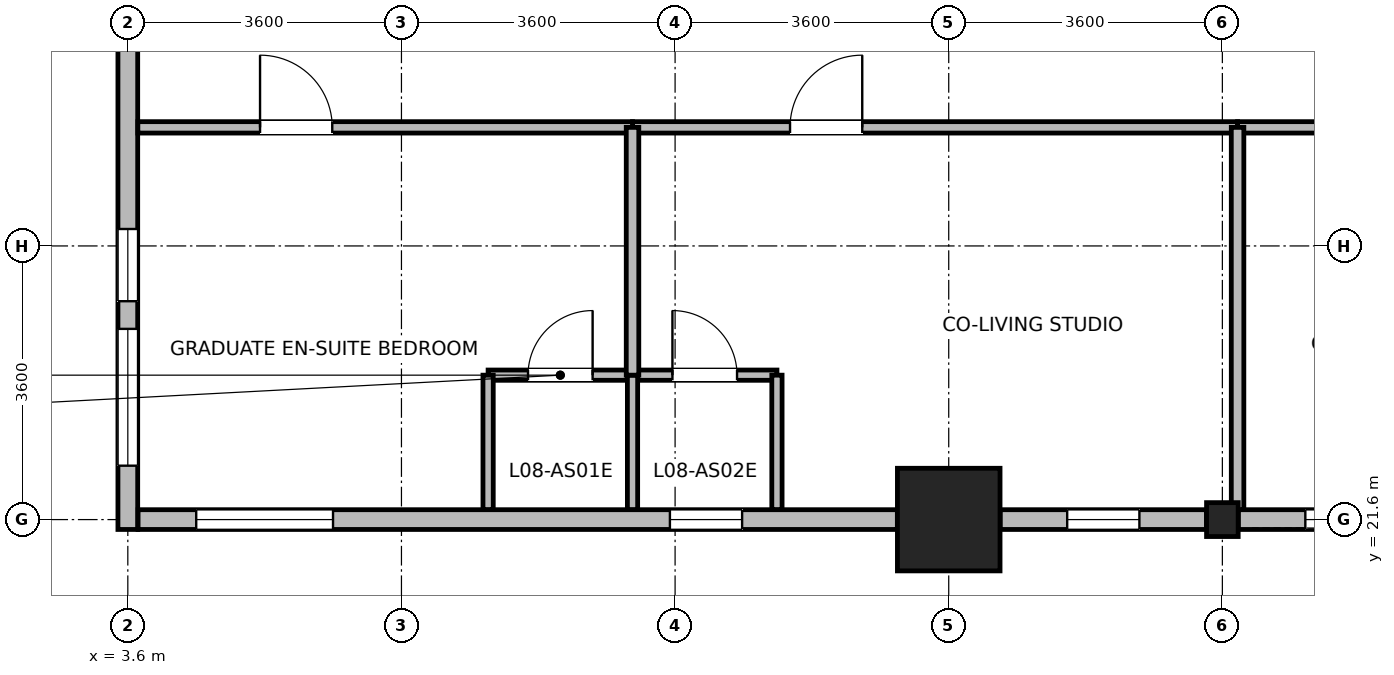
"""IFC4 building model, lengths in metres.
Left out: names, types, materials, properties, quantities, classifications, styles, units other than length and angle.
Written with IfcOpenShell. Run it as: python <this file> out.ifc"""

import sys

from ifc_helpers import new_model, si_unit, direction, frame, frame_2d, origin, origin_2d, place, context, subcontext, project, spatial, rectangle, i_section, extrude, source, transform, mapped, element, fill, save


model = new_model("IFC4")
c1 = context("Model", 3, precision=1e-05, world=origin(), true_north=direction((0.0, 1.0)))
c2 = subcontext(c1, "Body", "Model", "MODEL_VIEW")
j1 = project(units=[si_unit("LENGTHUNIT", "METRE"), si_unit("PLANEANGLEUNIT", "RADIAN")], contexts=[c1])
p1 = place(None, origin())
s1 = spatial("IfcSite", under=j1, at=p1, CompositionType="ELEMENT")
p2 = place(p1, origin())
s2 = spatial("IfcBuilding", under=s1, at=p2, CompositionType="ELEMENT")
p3 = place(p2, frame((0.0, 0.0, 36.4)))
s3 = spatial("IfcBuildingStorey", under=s2, at=p3, CompositionType="ELEMENT", Elevation=36.4)
m1 = source(origin(), c2, "Body", "SweptSolid", [
    extrude(rectangle(XDim=1.35, YDim=1.35, at=origin_2d()), origin(), (0.0, 0.0, 1.0), 3.7),
])
p4 = place(p3, frame((14.4, 21.6, 0.0), z_axis=(0.0, 0.0, 1.0), x_axis=(1.0, 0.0, 0.0)))
e1 = element("IfcColumn", 1, at=p4, inside=s3, PredefinedType="COLUMN", context=c2, shape_type="MappedRepresentation", body=[
    mapped(m1, transform((0.0, 0.0, 0.0), x_axis=(1.0, 0.0, 0.0), y_axis=(0.0, 1.0, 0.0), z_axis=(0.0, 0.0, 1.0), scale=1.0)),
])
m2 = source(origin(), c2, "Body", "SweptSolid", [
    extrude(i_section(OverallWidth=0.416, OverallDepth=0.446, WebThickness=0.029, FlangeThickness=0.04, FilletRadius=0.015, at=origin_2d()), origin(), (0.0, 0.0, 1.0), 3.7),
])
p5 = place(p3, frame((18.0, 21.6, 0.0), z_axis=(0.0, 0.0, 1.0), x_axis=(1.0, 0.0, 0.0)))
e2 = element("IfcColumn", 2, at=p5, inside=s3, PredefinedType="COLUMN", context=c2, shape_type="MappedRepresentation", body=[
    mapped(m2, transform((0.0, 0.0, 0.0), x_axis=(1.0, 0.0, 0.0), y_axis=(0.0, 1.0, 0.0), z_axis=(0.0, 0.0, 1.0), scale=1.0)),
])
p6 = place(p3, frame((3.6, 21.47, 0.0), z_axis=(0.0, 0.0, 1.0), x_axis=(0.0, 1.0, 0.0)))
e3 = element("IfcWall", 3, at=p6, inside=s3, PredefinedType="STANDARD", context=c2, shape_type="SweptSolid", body=[
    extrude(rectangle(XDim=6.956, YDim=0.26, at=frame_2d((3.478, 0.0))), origin(), (0.0, 0.0, 1.0), 3.43),
])
p7 = place(p6, frame((0.839, 0.0, 0.85)))
e4 = element("IfcOpeningElement", 4, at=p7, cuts=e3, PredefinedType="OPENING", context=c2, shape_type="SweptSolid", body=[
    extrude(rectangle(XDim=1.8, YDim=1.85, at=frame_2d((0.9, 0.925))), frame((0.0, 0.14, 0.0), z_axis=(0.0, -1.0, 0.0), x_axis=(1.0, 0.0, 0.0)), (0.0, 0.0, 1.0), 0.28),
])
p8 = place(p6, frame((3.003, 0.0, 0.85)))
e5 = element("IfcOpeningElement", 5, at=p8, cuts=e3, PredefinedType="OPENING", context=c2, shape_type="SweptSolid", body=[
    extrude(rectangle(XDim=0.95, YDim=1.75, at=frame_2d((0.475, 0.875))), frame((0.0, 0.14, 0.0), z_axis=(0.0, -1.0, 0.0), x_axis=(1.0, 0.0, 0.0)), (0.0, 0.0, 1.0), 0.28),
])
p9 = place(p3, frame((13.724, 21.6, 0.0), z_axis=(0.0, 0.0, 1.0), x_axis=(-1.0, 0.0, 0.0)))
e6 = element("IfcWall", 6, at=p9, inside=s3, PredefinedType="STANDARD", context=c2, shape_type="SweptSolid", body=[
    extrude(rectangle(XDim=9.989, YDim=0.26, at=frame_2d((4.995, 0.0))), origin(), (0.0, 0.0, 1.0), 3.43),
])
p10 = place(p9, frame((7.424, 0.0, 0.85)))
e7 = element("IfcOpeningElement", 7, at=p10, cuts=e6, PredefinedType="OPENING", context=c2, shape_type="SweptSolid", body=[
    extrude(rectangle(XDim=1.8, YDim=1.85, at=frame_2d((0.9, 0.925))), frame((0.0, 0.14, 0.0), z_axis=(0.0, -1.0, 0.0), x_axis=(1.0, 0.0, 0.0)), (0.0, 0.0, 1.0), 0.28),
])
p11 = place(p9, frame((2.042, 0.0, 0.85)))
e8 = element("IfcOpeningElement", 8, at=p11, cuts=e6, PredefinedType="OPENING", context=c2, shape_type="SweptSolid", body=[
    extrude(rectangle(XDim=0.95, YDim=1.75, at=frame_2d((0.475, 0.875))), frame((0.0, 0.14, 0.0), z_axis=(0.0, -1.0, 0.0), x_axis=(1.0, 0.0, 0.0)), (0.0, 0.0, 1.0), 0.28),
])
p12 = place(p3, frame((17.791, 21.6, 0.0), z_axis=(0.0, 0.0, 1.0), x_axis=(-1.0, 0.0, 0.0)))
e9 = element("IfcWall", 9, at=p12, inside=s3, PredefinedType="STANDARD", context=c2, shape_type="SweptSolid", body=[
    extrude(rectangle(XDim=2.715, YDim=0.26, at=frame_2d((1.357, 0.0))), origin(), (0.0, 0.0, 1.0), 2.93),
])
p13 = place(p12, frame((0.883, 0.0, 0.85)))
e10 = element("IfcOpeningElement", 10, at=p13, cuts=e9, PredefinedType="OPENING", context=c2, shape_type="SweptSolid", body=[
    extrude(rectangle(XDim=0.95, YDim=1.75, at=frame_2d((0.475, 0.875))), frame((0.0, 0.14, 0.0), z_axis=(0.0, -1.0, 0.0), x_axis=(1.0, 0.0, 0.0)), (0.0, 0.0, 1.0), 0.28),
])
p14 = place(p3, frame((20.924, 21.6, 0.0), z_axis=(0.0, 0.0, 1.0), x_axis=(-1.0, 0.0, 0.0)))
e11 = element("IfcWall", 11, at=p14, inside=s3, PredefinedType="STANDARD", context=c2, shape_type="SweptSolid", body=[
    extrude(rectangle(XDim=2.715, YDim=0.26, at=frame_2d((1.357, 0.0))), origin(), (0.0, 0.0, 1.0), 2.93),
])
p15 = place(p14, frame((0.883, 0.0, 0.85)))
e12 = element("IfcOpeningElement", 12, at=p15, cuts=e11, PredefinedType="OPENING", context=c2, shape_type="SweptSolid", body=[
    extrude(rectangle(XDim=0.95, YDim=1.75, at=frame_2d((0.475, 0.875))), frame((0.0, 0.14, 0.0), z_axis=(0.0, -1.0, 0.0), x_axis=(1.0, 0.0, 0.0)), (0.0, 0.0, 1.0), 0.28),
])
p16 = place(p3, frame((8.34, 23.5, 0.0), z_axis=(0.0, 0.0, 1.0), x_axis=(1.0, 0.0, 0.0)))
e13 = element("IfcWall", 13, at=p16, inside=s3, PredefinedType="PARTITIONING", context=c2, shape_type="SweptSolid", body=[
    extrude(rectangle(XDim=1.9, YDim=0.135, at=frame_2d((0.95, 0.0))), origin(), (0.0, 0.0, 1.0), 3.43),
])
p17 = place(p16, frame((0.525, 0.0, 0.0)))
e14 = element("IfcOpeningElement", 14, at=p17, cuts=e13, PredefinedType="OPENING", context=c2, shape_type="SweptSolid", body=[
    extrude(rectangle(XDim=0.85, YDim=2.04, at=frame_2d((0.425, 1.02))), frame((0.0, 0.078, 0.0), z_axis=(0.0, -1.0, 0.0), x_axis=(1.0, 0.0, 0.0)), (0.0, 0.0, 1.0), 0.155),
])
p18 = place(p3, frame((10.24, 23.5, 0.0), z_axis=(0.0, 0.0, 1.0), x_axis=(1.0, 0.0, 0.0)))
e15 = element("IfcWall", 15, at=p18, inside=s3, PredefinedType="PARTITIONING", context=c2, shape_type="SweptSolid", body=[
    extrude(rectangle(XDim=1.9, YDim=0.135, at=frame_2d((0.95, 0.0))), origin(), (0.0, 0.0, 1.0), 3.43),
])
p19 = place(p18, frame((0.525, 0.0, 0.0)))
e16 = element("IfcOpeningElement", 16, at=p19, cuts=e15, PredefinedType="OPENING", context=c2, shape_type="SweptSolid", body=[
    extrude(rectangle(XDim=0.85, YDim=2.04, at=frame_2d((0.425, 1.02))), frame((0.0, 0.078, 0.0), z_axis=(0.0, -1.0, 0.0), x_axis=(1.0, 0.0, 0.0)), (0.0, 0.0, 1.0), 0.155),
])
for number, where, z_axis, x_axis in (
    (17, (8.34, 21.732, 0.0), (0.0, 0.0, 1.0), (0.0, 1.0, 0.0)),
    (18, (10.24, 21.732, 0.0), (0.0, 0.0, 1.0), (0.0, 1.0, 0.0)),
    (19, (12.14, 21.732, 0.0), (0.0, 0.0, 1.0), (0.0, 1.0, 0.0)),
):
    element("IfcWall", number, at=place(p3, frame(where, z_axis=z_axis, x_axis=x_axis)), inside=s3, PredefinedType="PARTITIONING", context=c2, shape_type="SweptSolid", body=[
        extrude(rectangle(XDim=1.768, YDim=0.135, at=frame_2d((0.884, 0.0))), origin(), (0.0, 0.0, 1.0), 3.43),
    ])
p20 = place(p3, frame((10.24, 26.76, 0.0), z_axis=(0.0, 0.0, 1.0), x_axis=(1.0, 0.0, 0.0)))
e20 = element("IfcWall", 20, at=p20, inside=s3, PredefinedType="PARTITIONING", context=c2, shape_type="SweptSolid", body=[
    extrude(rectangle(XDim=7.96, YDim=0.15, at=frame_2d((3.98, 0.0))), origin(), (0.0, 0.0, 1.0), 3.43),
])
p21 = place(p20, frame((2.072, 0.0, 0.0)))
e21 = element("IfcOpeningElement", 21, at=p21, cuts=e20, PredefinedType="OPENING", context=c2, shape_type="SweptSolid", body=[
    extrude(rectangle(XDim=0.95, YDim=2.1, at=frame_2d((0.475, 1.05))), frame((0.0, 0.085, 0.0), z_axis=(0.0, -1.0, 0.0), x_axis=(1.0, 0.0, 0.0)), (0.0, 0.0, 1.0), 0.17),
])
p22 = place(p3, frame((3.732, 26.76, 0.0), z_axis=(0.0, 0.0, 1.0), x_axis=(1.0, 0.0, 0.0)))
e22 = element("IfcWall", 22, at=p22, inside=s3, PredefinedType="PARTITIONING", context=c2, shape_type="SweptSolid", body=[
    extrude(rectangle(XDim=6.508, YDim=0.15, at=frame_2d((3.254, 0.0))), origin(), (0.0, 0.0, 1.0), 3.43),
])
p23 = place(p22, frame((1.608, 0.0, 0.0)))
e23 = element("IfcOpeningElement", 23, at=p23, cuts=e22, PredefinedType="OPENING", context=c2, shape_type="SweptSolid", body=[
    extrude(rectangle(XDim=0.95, YDim=2.1, at=frame_2d((0.475, 1.05))), frame((0.0, 0.085, 0.0), z_axis=(0.0, -1.0, 0.0), x_axis=(1.0, 0.0, 0.0)), (0.0, 0.0, 1.0), 0.17),
])
p24 = place(p3, frame((18.2, 26.76, 0.0), z_axis=(0.0, 0.0, 1.0), x_axis=(1.0, 0.0, 0.0)))
e24 = element("IfcWall", 24, at=p24, inside=s3, PredefinedType="PARTITIONING", context=c2, shape_type="SweptSolid", body=[
    extrude(rectangle(XDim=6.38, YDim=0.15, at=frame_2d((3.19, 0.0))), origin(), (0.0, 0.0, 1.0), 3.43),
])
p25 = place(p24, frame((2.54, 0.0, 0.0)))
e25 = element("IfcOpeningElement", 25, at=p25, cuts=e24, PredefinedType="OPENING", context=c2, shape_type="SweptSolid", body=[
    extrude(rectangle(XDim=1.3, YDim=2.12, at=frame_2d((0.65, 1.06))), frame((0.0, 0.085, 0.0), z_axis=(0.0, -1.0, 0.0), x_axis=(1.0, 0.0, 0.0)), (0.0, 0.0, 1.0), 0.17),
])
p26 = place(p3, frame((18.2, 21.732, 0.0), z_axis=(0.0, 0.0, 1.0), x_axis=(0.0, 1.0, 0.0)))
e26 = element("IfcWall", 26, at=p26, inside=s3, PredefinedType="PARTITIONING", context=c2, shape_type="SweptSolid", body=[
    extrude(rectangle(XDim=5.028, YDim=0.165, at=frame_2d((2.514, 0.0))), origin(), (0.0, 0.0, 1.0), 3.07),
])
p27 = place(p3, frame((10.24, 23.5, 0.0), z_axis=(0.0, 0.0, 1.0), x_axis=(0.0, 1.0, 0.0)))
e27 = element("IfcWall", 27, at=p27, inside=s3, PredefinedType="PARTITIONING", context=c2, shape_type="SweptSolid", body=[
    extrude(rectangle(XDim=3.26, YDim=0.165, at=frame_2d((1.63, 0.0))), origin(), (0.0, 0.0, 1.0), 3.43),
])
p28 = place(p7, origin())
e28 = element("IfcWindow", 28, at=p28, inside=s3, PartitioningType="SINGLE_PANEL", PredefinedType="WINDOW", context=c2, shape_type="SweptSolid", body=[
    extrude(rectangle(XDim=1.8, YDim=1.85, at=frame_2d((0.9, 0.925))), frame((0.0, 0.03, 0.0), z_axis=(0.0, -1.0, 0.0), x_axis=(1.0, 0.0, 0.0)), (0.0, 0.0, 1.0), 0.06),
])
fill(e4, e28)
p29 = place(p8, origin())
e29 = element("IfcWindow", 29, at=p29, inside=s3, PartitioningType="SINGLE_PANEL", PredefinedType="WINDOW", context=c2, shape_type="SweptSolid", body=[
    extrude(rectangle(XDim=0.95, YDim=1.75, at=frame_2d((0.475, 0.875))), frame((0.0, 0.03, 0.0), z_axis=(0.0, -1.0, 0.0), x_axis=(1.0, 0.0, 0.0)), (0.0, 0.0, 1.0), 0.06),
])
fill(e5, e29)
p30 = place(p10, origin())
e30 = element("IfcWindow", 30, at=p30, inside=s3, PartitioningType="SINGLE_PANEL", PredefinedType="WINDOW", context=c2, shape_type="SweptSolid", body=[
    extrude(rectangle(XDim=1.8, YDim=1.85, at=frame_2d((0.9, 0.925))), frame((0.0, 0.03, 0.0), z_axis=(0.0, -1.0, 0.0), x_axis=(1.0, 0.0, 0.0)), (0.0, 0.0, 1.0), 0.06),
])
fill(e7, e30)
p31 = place(p11, origin())
e31 = element("IfcWindow", 31, at=p31, inside=s3, PartitioningType="SINGLE_PANEL", PredefinedType="WINDOW", context=c2, shape_type="SweptSolid", body=[
    extrude(rectangle(XDim=0.95, YDim=1.75, at=frame_2d((0.475, 0.875))), frame((0.0, 0.03, 0.0), z_axis=(0.0, -1.0, 0.0), x_axis=(1.0, 0.0, 0.0)), (0.0, 0.0, 1.0), 0.06),
])
fill(e8, e31)
p32 = place(p13, origin())
e32 = element("IfcWindow", 32, at=p32, inside=s3, PartitioningType="SINGLE_PANEL", PredefinedType="WINDOW", context=c2, shape_type="SweptSolid", body=[
    extrude(rectangle(XDim=0.95, YDim=1.75, at=frame_2d((0.475, 0.875))), frame((0.0, 0.03, 0.0), z_axis=(0.0, -1.0, 0.0), x_axis=(1.0, 0.0, 0.0)), (0.0, 0.0, 1.0), 0.06),
])
fill(e10, e32)
p33 = place(p15, origin())
e33 = element("IfcWindow", 33, at=p33, inside=s3, PartitioningType="SINGLE_PANEL", PredefinedType="WINDOW", context=c2, shape_type="SweptSolid", body=[
    extrude(rectangle(XDim=0.95, YDim=1.75, at=frame_2d((0.475, 0.875))), frame((0.0, 0.03, 0.0), z_axis=(0.0, -1.0, 0.0), x_axis=(1.0, 0.0, 0.0)), (0.0, 0.0, 1.0), 0.06),
])
fill(e12, e33)
p34 = place(p17, origin())
e34 = element("IfcDoor", 34, at=p34, inside=s3, OperationType="SINGLE_SWING_RIGHT", PredefinedType="DOOR", context=c2, shape_type="SweptSolid", body=[
    extrude(rectangle(XDim=0.85, YDim=2.04, at=frame_2d((0.425, 1.02))), frame((0.0, 0.025, 0.0), z_axis=(0.0, -1.0, 0.0), x_axis=(1.0, 0.0, 0.0)), (0.0, 0.0, 1.0), 0.05),
])
fill(e14, e34)
p35 = place(p19, origin())
e35 = element("IfcDoor", 35, at=p35, inside=s3, OperationType="SINGLE_SWING_LEFT", PredefinedType="DOOR", context=c2, shape_type="SweptSolid", body=[
    extrude(rectangle(XDim=0.85, YDim=2.04, at=frame_2d((0.425, 1.02))), frame((0.0, 0.025, 0.0), z_axis=(0.0, -1.0, 0.0), x_axis=(1.0, 0.0, 0.0)), (0.0, 0.0, 1.0), 0.05),
])
fill(e16, e35)
p36 = place(p21, origin())
e36 = element("IfcDoor", 36, at=p36, inside=s3, OperationType="SINGLE_SWING_RIGHT", PredefinedType="DOOR", context=c2, shape_type="SweptSolid", body=[
    extrude(rectangle(XDim=0.95, YDim=2.1, at=frame_2d((0.475, 1.05))), frame((0.0, 0.025, 0.0), z_axis=(0.0, -1.0, 0.0), x_axis=(1.0, 0.0, 0.0)), (0.0, 0.0, 1.0), 0.05),
])
fill(e21, e36)
p37 = place(p23, origin())
e37 = element("IfcDoor", 37, at=p37, inside=s3, OperationType="SINGLE_SWING_LEFT", PredefinedType="DOOR", context=c2, shape_type="SweptSolid", body=[
    extrude(rectangle(XDim=0.95, YDim=2.1, at=frame_2d((0.475, 1.05))), frame((0.0, 0.025, 0.0), z_axis=(0.0, -1.0, 0.0), x_axis=(1.0, 0.0, 0.0)), (0.0, 0.0, 1.0), 0.05),
])
fill(e23, e37)
save(model, sys.argv[1])
